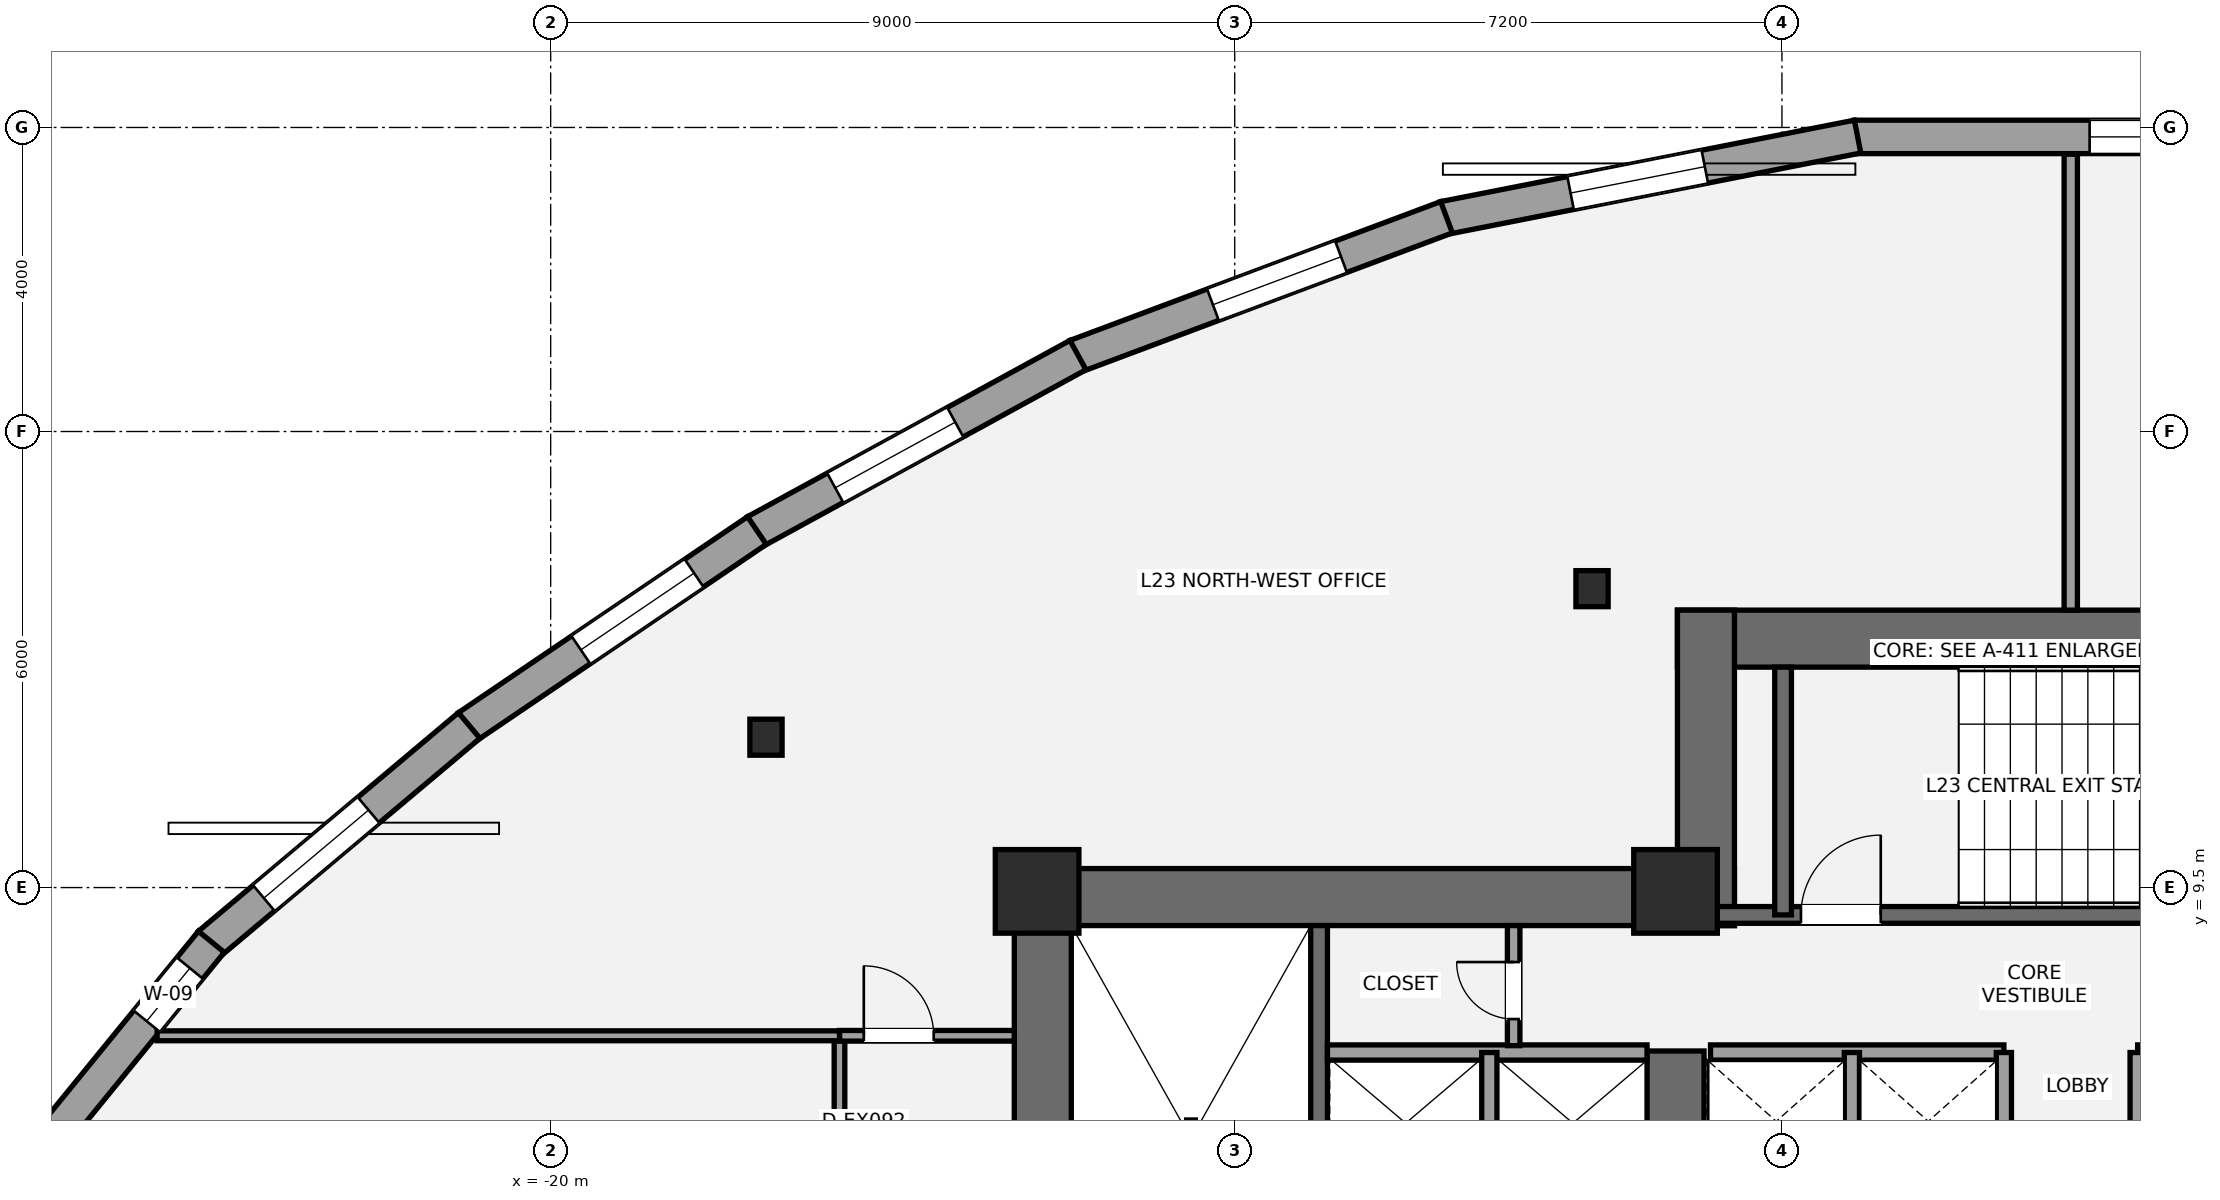
"""IFC4 building model, lengths in metres.
Left out: names, types, materials, properties, quantities, classifications, styles, units other than length and angle.
Written with IfcOpenShell. Run it as: python <this file> out.ifc"""

import sys

from ifc_helpers import new_model, si_unit, direction, frame, frame_2d, origin, origin_2d, place, context, subcontext, project, spatial, rectangle, i_section, extrude, element, fill, save


model = new_model("IFC4")
c1 = context("Model", 3, precision=1e-05, world=origin(), true_north=direction((0.0, 1.0)))
c2 = subcontext(c1, "Body", "Model", "MODEL_VIEW")
j1 = project(units=[si_unit("LENGTHUNIT", "METRE"), si_unit("PLANEANGLEUNIT", "RADIAN")], contexts=[c1])
p1 = place(None, origin())
s1 = spatial("IfcSite", under=j1, at=p1, CompositionType="ELEMENT")
p2 = place(p1, origin())
s2 = spatial("IfcBuilding", under=s1, at=p2, CompositionType="ELEMENT")
p3 = place(p2, frame((0.0, 0.0, 89.6)))
s3 = spatial("IfcBuildingStorey", under=s2, at=p3, CompositionType="ELEMENT", Elevation=89.6)
p4 = place(p3, frame((-13.525, 1.1, 0.0), z_axis=(0.0, 0.0, 1.0), x_axis=(0.0, 1.0, 0.0)))
e1 = element("IfcWall", 1, at=p4, inside=s3, PredefinedType="SHEAR", context=c2, shape_type="SweptSolid", body=[
    extrude(rectangle(XDim=8.65, YDim=0.75, at=frame_2d((4.325, 0.0))), origin(), (0.0, 0.0, 1.0), 3.5),
])
p5 = place(p3, frame((-13.9, 9.375, 0.0), z_axis=(0.0, 0.0, 1.0), x_axis=(1.0, 0.0, 0.0)))
e2 = element("IfcWall", 2, at=p5, inside=s3, PredefinedType="SHEAR", context=c2, shape_type="SweptSolid", body=[
    extrude(rectangle(XDim=9.475, YDim=0.75, at=frame_2d((4.737, 0.0))), origin(), (0.0, 0.0, 1.0), 3.5),
])
p6 = place(p3, frame((-5.2, 5.35, 0.0), z_axis=(0.0, 0.0, 1.0), x_axis=(0.0, 1.0, 0.0)))
e3 = element("IfcWall", 3, at=p6, inside=s3, PredefinedType="SHEAR", context=c2, shape_type="SweptSolid", body=[
    extrude(rectangle(XDim=2.0, YDim=0.75, at=frame_2d((1.0, 0.0))), origin(), (0.0, 0.0, 1.0), 3.5),
])
p7 = place(p3, frame((-9.89, 1.85, 0.0), z_axis=(0.0, 0.0, 1.0), x_axis=(0.0, 1.0, 0.0)))
e4 = element("IfcWall", 4, at=p7, inside=s3, PredefinedType="SHEAR", context=c2, shape_type="SweptSolid", body=[
    extrude(rectangle(XDim=7.15, YDim=0.22, at=frame_2d((3.575, 0.0))), origin(), (0.0, 0.0, 1.0), 3.5),
])
p8 = place(p3, frame((-5.175, 12.775, 0.0), z_axis=(0.0, 0.0, 1.0), x_axis=(1.0, 0.0, 0.0)))
e5 = element("IfcWall", 5, at=p8, inside=s3, PredefinedType="SHEAR", context=c2, shape_type="SweptSolid", body=[
    extrude(rectangle(XDim=10.35, YDim=0.75, at=frame_2d((5.175, 0.0))), origin(), (0.0, 0.0, 1.0), 3.5),
])
p9 = place(p3, frame((-4.8, 9.0, 0.0), z_axis=(0.0, 0.0, 1.0), x_axis=(0.0, 1.0, 0.0)))
e6 = element("IfcWall", 6, at=p9, inside=s3, PredefinedType="SHEAR", context=c2, shape_type="SweptSolid", body=[
    extrude(rectangle(XDim=4.15, YDim=0.75, at=frame_2d((2.075, 0.0))), origin(), (0.0, 0.0, 1.0), 3.5),
])
p10 = place(p3, frame((-4.7, 9.14, 0.0), z_axis=(0.0, 0.0, 1.0), x_axis=(1.0, 0.0, 0.0)))
e7 = element("IfcWall", 7, at=p10, inside=s3, PredefinedType="SHEAR", context=c2, shape_type="SweptSolid", body=[
    extrude(rectangle(XDim=9.3, YDim=0.22, at=frame_2d((4.65, 0.0))), origin(), (0.0, 0.0, 1.0), 3.5),
])
p11 = place(p10, frame((1.15, 0.0, 0.0)))
e8 = element("IfcOpeningElement", 8, at=p11, cuts=e7, PredefinedType="OPENING", context=c2, shape_type="SweptSolid", body=[
    extrude(rectangle(XDim=1.05, YDim=2.15, at=frame_2d((0.525, 1.075))), frame((0.0, 0.12, 0.0), z_axis=(0.0, -1.0, 0.0), x_axis=(1.0, 0.0, 0.0)), (0.0, 0.0, 1.0), 0.24),
])
p12 = place(p3, frame((-3.785, 9.14, 0.0), z_axis=(0.0, 0.0, 1.0), x_axis=(0.0, 1.0, 0.0)))
e9 = element("IfcWall", 9, at=p12, inside=s3, PredefinedType="SHEAR", context=c2, shape_type="SweptSolid", body=[
    extrude(rectangle(XDim=3.26, YDim=0.22, at=frame_2d((1.63, 0.0))), origin(), (0.0, 0.0, 1.0), 3.5),
])
for number, where, z_axis, x_axis in (
    (10, (-13.6, 9.45, 0.0), (0.0, 0.0, 1.0), (1.0, 0.0, 0.0)),
    (11, (-5.2, 9.45, 0.0), (0.0, 0.0, 1.0), (1.0, 0.0, 0.0)),
):
    element("IfcColumn", number, at=place(p3, frame(where, z_axis=z_axis, x_axis=x_axis)), inside=s3, PredefinedType="COLUMN", context=c2, shape_type="SweptSolid", body=[
        extrude(rectangle(XDim=1.1, YDim=1.1, at=origin_2d()), origin(), (0.0, 0.0, 1.0), 3.5),
    ])
for number, where, z_axis, x_axis in (
    (12, (-6.299, 13.433, 0.0), (0.0, 0.0, 1.0), (1.0, 0.0, 0.0)),
    (13, (-17.167, 11.478, 0.0), (0.0, 0.0, 1.0), (1.0, 0.0, 0.0)),
):
    element("IfcColumn", number, at=place(p3, frame(where, z_axis=z_axis, x_axis=x_axis)), inside=s3, PredefinedType="COLUMN", context=c2, shape_type="SweptSolid", body=[
        extrude(i_section(OverallWidth=0.424, OverallDepth=0.474, WebThickness=0.048, FlangeThickness=0.077, at=origin_2d()), origin(), (0.0, 0.0, 1.0), 3.5),
    ])
p13 = place(p3, frame((-2.847, 19.376, 0.0), z_axis=(0.0, 0.0, 1.0), x_axis=(1.0, 0.0, 0.0)))
e14 = element("IfcWall", 14, at=p13, inside=s3, PredefinedType="STANDARD", context=c2, shape_type="SweptSolid", body=[
    extrude(rectangle(XDim=5.695, YDim=0.44, at=frame_2d((2.847, 0.0))), origin(), (0.0, 0.0, 1.0), 2.528),
])
p14 = place(p13, frame((3.095, 0.0, 0.65)))
e15 = element("IfcOpeningElement", 15, at=p14, cuts=e14, PredefinedType="OPENING", context=c2, shape_type="SweptSolid", body=[
    extrude(rectangle(XDim=1.8, YDim=1.7, at=frame_2d((0.9, 0.85))), frame((0.0, 0.23, 0.0), z_axis=(0.0, -1.0, 0.0), x_axis=(1.0, 0.0, 0.0)), (0.0, 0.0, 1.0), 0.46),
])
p15 = place(p3, frame((-8.248, 18.309, 0.0), z_axis=(0.0, 0.0, 1.0), x_axis=(0.981185300561, 0.19306839711, 0.0)))
e16 = element("IfcWall", 16, at=p15, inside=s3, PredefinedType="STANDARD", context=c2, shape_type="SweptSolid", body=[
    extrude(rectangle(XDim=5.548, YDim=0.44, at=frame_2d((2.774, 0.0))), origin(), (0.0, 0.0, 1.0), 2.528),
])
p16 = place(p15, frame((1.699, 0.0, 0.65)))
e17 = element("IfcOpeningElement", 17, at=p16, cuts=e16, PredefinedType="OPENING", context=c2, shape_type="SweptSolid", body=[
    extrude(rectangle(XDim=1.8, YDim=1.7, at=frame_2d((0.9, 0.85))), frame((0.0, 0.23, 0.0), z_axis=(0.0, -1.0, 0.0), x_axis=(1.0, 0.0, 0.0)), (0.0, 0.0, 1.0), 0.46),
])
p17 = place(p3, frame((-13.09, 16.492, 0.0), z_axis=(0.0, 0.0, 1.0), x_axis=(0.936473584013, 0.350738116613, 0.0)))
e18 = element("IfcWall", 18, at=p17, inside=s3, PredefinedType="STANDARD", context=c2, shape_type="SweptSolid", body=[
    extrude(rectangle(XDim=5.208, YDim=0.44, at=frame_2d((2.604, 0.0))), origin(), (0.0, 0.0, 1.0), 2.528),
])
p18 = place(p17, frame((1.926, 0.0, 0.65)))
e19 = element("IfcOpeningElement", 19, at=p18, cuts=e18, PredefinedType="OPENING", context=c2, shape_type="SweptSolid", body=[
    extrude(rectangle(XDim=1.8, YDim=1.7, at=frame_2d((0.9, 0.85))), frame((0.0, 0.23, 0.0), z_axis=(0.0, -1.0, 0.0), x_axis=(1.0, 0.0, 0.0)), (0.0, 0.0, 1.0), 0.46),
])
p19 = place(p3, frame((-17.304, 14.186, 0.0), z_axis=(0.0, 0.0, 1.0), x_axis=(0.877445532469, 0.479676284123, 0.0)))
e20 = element("IfcWall", 20, at=p19, inside=s3, PredefinedType="STANDARD", context=c2, shape_type="SweptSolid", body=[
    extrude(rectangle(XDim=4.835, YDim=0.44, at=frame_2d((2.417, 0.0))), origin(), (0.0, 0.0, 1.0), 2.528),
])
p20 = place(p19, frame((1.194, 0.0, 0.65)))
e21 = element("IfcOpeningElement", 21, at=p20, cuts=e20, PredefinedType="OPENING", context=c2, shape_type="SweptSolid", body=[
    extrude(rectangle(XDim=1.8, YDim=1.7, at=frame_2d((0.9, 0.85))), frame((0.0, 0.23, 0.0), z_axis=(0.0, -1.0, 0.0), x_axis=(1.0, 0.0, 0.0)), (0.0, 0.0, 1.0), 0.46),
])
p21 = place(p3, frame((-21.09, 11.619, 0.0), z_axis=(0.0, 0.0, 1.0), x_axis=(0.827742791179, 0.561107718403, 0.0)))
e22 = element("IfcWall", 22, at=p21, inside=s3, PredefinedType="STANDARD", context=c2, shape_type="SweptSolid", body=[
    extrude(rectangle(XDim=4.595, YDim=0.44, at=frame_2d((2.298, 0.0))), origin(), (0.0, 0.0, 1.0), 2.528),
])
p22 = place(p21, frame((1.797, 0.0, 0.65)))
e23 = element("IfcOpeningElement", 23, at=p22, cuts=e22, PredefinedType="OPENING", context=c2, shape_type="SweptSolid", body=[
    extrude(rectangle(XDim=1.8, YDim=1.7, at=frame_2d((0.9, 0.85))), frame((0.0, 0.23, 0.0), z_axis=(0.0, -1.0, 0.0), x_axis=(1.0, 0.0, 0.0)), (0.0, 0.0, 1.0), 0.46),
])
p23 = place(p3, frame((-24.493, 8.757, 0.0), z_axis=(0.0, 0.0, 1.0), x_axis=(0.765563867956, 0.643359902449, 0.0)))
e24 = element("IfcWall", 24, at=p23, inside=s3, PredefinedType="STANDARD", context=c2, shape_type="SweptSolid", body=[
    extrude(rectangle(XDim=4.469, YDim=0.44, at=frame_2d((2.234, 0.0))), origin(), (0.0, 0.0, 1.0), 2.528),
])
p24 = place(p23, frame((0.94, 0.0, 0.65)))
e25 = element("IfcOpeningElement", 25, at=p24, cuts=e24, PredefinedType="OPENING", context=c2, shape_type="SweptSolid", body=[
    extrude(rectangle(XDim=1.8, YDim=1.7, at=frame_2d((0.9, 0.85))), frame((0.0, 0.23, 0.0), z_axis=(0.0, -1.0, 0.0), x_axis=(1.0, 0.0, 0.0)), (0.0, 0.0, 1.0), 0.46),
])
p25 = place(p3, frame((-27.159, 5.48, 0.0), z_axis=(0.0, 0.0, 1.0), x_axis=(0.631768505266, 0.775157116818, 0.0)))
e26 = element("IfcWall", 26, at=p25, inside=s3, PredefinedType="STANDARD", context=c2, shape_type="SweptSolid", body=[
    extrude(rectangle(XDim=4.265, YDim=0.44, at=frame_2d((2.133, 0.0))), origin(), (0.0, 0.0, 1.0), 2.528),
])
p26 = place(p25, frame((2.918, 0.0, 0.58)))
e27 = element("IfcOpeningElement", 27, at=p26, cuts=e26, PredefinedType="OPENING", context=c2, shape_type="SweptSolid", body=[
    extrude(rectangle(XDim=0.9, YDim=1.35, at=frame_2d((0.45, 0.675))), frame((0.0, 0.23, 0.0), z_axis=(0.0, -1.0, 0.0), x_axis=(1.0, 0.0, 0.0)), (0.0, 0.0, 1.0), 0.46),
])
p27 = place(p3, frame((-9.78, 7.33, 0.0), z_axis=(0.0, 0.0, 1.0), x_axis=(1.0, 0.0, 0.0)))
e28 = element("IfcWall", 28, at=p27, inside=s3, PredefinedType="SOLIDWALL", context=c2, shape_type="SweptSolid", body=[
    extrude(rectangle(XDim=4.205, YDim=0.2, at=frame_2d((2.103, 0.0))), origin(), (0.0, 0.0, 1.0), 3.31),
])
p28 = place(p3, frame((-7.65, 5.47, 0.0), z_axis=(0.0, 0.0, 1.0), x_axis=(0.0, 1.0, 0.0)))
e29 = element("IfcWall", 29, at=p28, inside=s3, PredefinedType="SOLIDWALL", context=c2, shape_type="SweptSolid", body=[
    extrude(rectangle(XDim=1.86, YDim=0.2, at=frame_2d((0.93, 0.0))), origin(), (0.0, 0.0, 1.0), 3.31),
])
for number, where, z_axis, x_axis in (
    (30, (-4.74, 7.33, 0.0), (0.0, 0.0, 1.0), (1.0, 0.0, 0.0)),
    (31, (0.88, 7.33, 0.0), (0.0, 0.0, 1.0), (1.0, 0.0, 0.0)),
):
    element("IfcWall", number, at=place(p3, frame(where, z_axis=z_axis, x_axis=x_axis)), inside=s3, PredefinedType="SOLIDWALL", context=c2, shape_type="SweptSolid", body=[
        extrude(rectangle(XDim=3.86, YDim=0.2, at=frame_2d((1.93, 0.0))), origin(), (0.0, 0.0, 1.0), 3.31),
    ])
for number, where, z_axis, x_axis in (
    (32, (-2.88, 5.52, 0.0), (0.0, 0.0, 1.0), (0.0, 1.0, 0.0)),
    (33, (-0.88, 5.52, 0.0), (0.0, 0.0, 1.0), (0.0, 1.0, 0.0)),
    (34, (0.88, 5.52, 0.0), (0.0, 0.0, 1.0), (0.0, 1.0, 0.0)),
):
    element("IfcWall", number, at=place(p3, frame(where, z_axis=z_axis, x_axis=x_axis)), inside=s3, PredefinedType="SOLIDWALL", context=c2, shape_type="SweptSolid", body=[
        extrude(rectangle(XDim=1.81, YDim=0.2, at=frame_2d((0.905, 0.0))), origin(), (0.0, 0.0, 1.0), 3.31),
    ])
p29 = place(p3, frame((-7.33, 7.42, 0.0), z_axis=(0.0, 0.0, 1.0), x_axis=(0.0, 1.0, 0.0)))
e35 = element("IfcWall", 35, at=p29, inside=s3, PredefinedType="PARTITIONING", context=c2, shape_type="SweptSolid", body=[
    extrude(rectangle(XDim=1.58, YDim=0.165, at=frame_2d((0.79, 0.0))), origin(), (0.0, 0.0, 1.0), 3.31),
])
p30 = place(p29, frame((0.35, 0.0, 0.0)))
e36 = element("IfcOpeningElement", 36, at=p30, cuts=e35, PredefinedType="OPENING", context=c2, shape_type="SweptSolid", body=[
    extrude(rectangle(XDim=0.75, YDim=2.1, at=frame_2d((0.375, 1.05))), frame((0.0, 0.093, 0.0), z_axis=(0.0, -1.0, 0.0), x_axis=(1.0, 0.0, 0.0)), (0.0, 0.0, 1.0), 0.185),
])
p31 = place(p3, frame((-16.2, -14.53, 0.0), z_axis=(0.0, 0.0, 1.0), x_axis=(0.0, 1.0, 0.0)))
e37 = element("IfcWall", 37, at=p31, inside=s3, PredefinedType="PARTITIONING", context=c2, shape_type="SweptSolid", body=[
    extrude(rectangle(XDim=22.08, YDim=0.14, at=frame_2d((11.04, 0.0))), origin(), (0.0, 0.0, 1.0), 2.751),
])
p32 = place(p31, frame((12.18, 0.0, 0.0)))
e38 = element("IfcOpeningElement", 38, at=p32, cuts=e37, PredefinedType="OPENING", context=c2, shape_type="SweptSolid", body=[
    extrude(rectangle(XDim=0.9, YDim=2.1, at=frame_2d((0.45, 1.05))), frame((0.0, 0.08, 0.0), z_axis=(0.0, -1.0, 0.0), x_axis=(1.0, 0.0, 0.0)), (0.0, 0.0, 1.0), 0.16),
])
p33 = place(p31, frame((18.855, 0.0, 0.0)))
e39 = element("IfcOpeningElement", 39, at=p33, cuts=e37, PredefinedType="OPENING", context=c2, shape_type="SweptSolid", body=[
    extrude(rectangle(XDim=0.9, YDim=2.1, at=frame_2d((0.45, 1.05))), frame((0.0, 0.08, 0.0), z_axis=(0.0, -1.0, 0.0), x_axis=(1.0, 0.0, 0.0)), (0.0, 0.0, 1.0), 0.16),
])
p34 = place(p3, frame((-16.2, 7.55, 0.0), z_axis=(0.0, 0.0, 1.0), x_axis=(1.0, 0.0, 0.0)))
e40 = element("IfcWall", 40, at=p34, inside=s3, PredefinedType="PARTITIONING", context=c2, shape_type="SweptSolid", body=[
    extrude(rectangle(XDim=2.3, YDim=0.14, at=frame_2d((1.15, 0.0))), origin(), (0.0, 0.0, 1.0), 2.763),
])
p35 = place(p34, frame((0.32, 0.0, 0.0)))
e41 = element("IfcOpeningElement", 41, at=p35, cuts=e40, PredefinedType="OPENING", context=c2, shape_type="SweptSolid", body=[
    extrude(rectangle(XDim=0.92, YDim=2.15, at=frame_2d((0.46, 1.075))), frame((0.0, 0.08, 0.0), z_axis=(0.0, -1.0, 0.0), x_axis=(1.0, 0.0, 0.0)), (0.0, 0.0, 1.0), 0.16),
])
p36 = place(p3, frame((0.0, 13.15, 0.0), z_axis=(0.0, 0.0, 1.0), x_axis=(0.0, 1.0, 0.0)))
e42 = element("IfcWall", 42, at=p36, inside=s3, PredefinedType="PARTITIONING", context=c2, shape_type="SweptSolid", body=[
    extrude(rectangle(XDim=5.998, YDim=0.175, at=frame_2d((2.999, 0.0))), origin(), (0.0, 0.0, 1.0), 2.763),
])
p37 = place(p3, frame((-25.178, 7.55, 0.0), z_axis=(0.0, 0.0, 1.0), x_axis=(1.0, 0.0, 0.0)))
e43 = element("IfcWall", 43, at=p37, inside=s3, PredefinedType="PARTITIONING", context=c2, shape_type="SweptSolid", body=[
    extrude(rectangle(XDim=8.978, YDim=0.13, at=frame_2d((4.489, 0.0))), origin(), (0.0, 0.0, 1.0), 2.763),
])
p38 = place(p14, origin())
e44 = element("IfcWindow", 44, at=p38, inside=s3, PartitioningType="SINGLE_PANEL", PredefinedType="WINDOW", context=c2, shape_type="SweptSolid", body=[
    extrude(rectangle(XDim=1.8, YDim=1.7, at=frame_2d((0.9, 0.85))), frame((0.0, -0.01, 0.0), z_axis=(0.0, -1.0, 0.0), x_axis=(1.0, 0.0, 0.0)), (0.0, 0.0, 1.0), 0.06),
])
fill(e15, e44)
p39 = place(p16, origin())
e45 = element("IfcWindow", 45, at=p39, inside=s3, PartitioningType="SINGLE_PANEL", PredefinedType="WINDOW", context=c2, shape_type="SweptSolid", body=[
    extrude(rectangle(XDim=1.8, YDim=1.7, at=frame_2d((0.9, 0.85))), frame((0.0, -0.01, 0.0), z_axis=(0.0, -1.0, 0.0), x_axis=(1.0, 0.0, 0.0)), (0.0, 0.0, 1.0), 0.06),
])
fill(e17, e45)
p40 = place(p18, origin())
e46 = element("IfcWindow", 46, at=p40, inside=s3, PartitioningType="SINGLE_PANEL", PredefinedType="WINDOW", context=c2, shape_type="SweptSolid", body=[
    extrude(rectangle(XDim=1.8, YDim=1.7, at=frame_2d((0.9, 0.85))), frame((0.0, -0.01, 0.0), z_axis=(0.0, -1.0, 0.0), x_axis=(1.0, 0.0, 0.0)), (0.0, 0.0, 1.0), 0.06),
])
fill(e19, e46)
p41 = place(p20, origin())
e47 = element("IfcWindow", 47, at=p41, inside=s3, PartitioningType="SINGLE_PANEL", PredefinedType="WINDOW", context=c2, shape_type="SweptSolid", body=[
    extrude(rectangle(XDim=1.8, YDim=1.7, at=frame_2d((0.9, 0.85))), frame((0.0, -0.01, 0.0), z_axis=(0.0, -1.0, 0.0), x_axis=(1.0, 0.0, 0.0)), (0.0, 0.0, 1.0), 0.06),
])
fill(e21, e47)
p42 = place(p22, origin())
e48 = element("IfcWindow", 48, at=p42, inside=s3, PartitioningType="SINGLE_PANEL", PredefinedType="WINDOW", context=c2, shape_type="SweptSolid", body=[
    extrude(rectangle(XDim=1.8, YDim=1.7, at=frame_2d((0.9, 0.85))), frame((0.0, -0.01, 0.0), z_axis=(0.0, -1.0, 0.0), x_axis=(1.0, 0.0, 0.0)), (0.0, 0.0, 1.0), 0.06),
])
fill(e23, e48)
p43 = place(p24, origin())
e49 = element("IfcWindow", 49, at=p43, inside=s3, PartitioningType="SINGLE_PANEL", PredefinedType="WINDOW", context=c2, shape_type="SweptSolid", body=[
    extrude(rectangle(XDim=1.8, YDim=1.7, at=frame_2d((0.9, 0.85))), frame((0.0, -0.01, 0.0), z_axis=(0.0, -1.0, 0.0), x_axis=(1.0, 0.0, 0.0)), (0.0, 0.0, 1.0), 0.06),
])
fill(e25, e49)
p44 = place(p26, origin())
e50 = element("IfcWindow", 50, at=p44, inside=s3, PartitioningType="SINGLE_PANEL", PredefinedType="WINDOW", context=c2, shape_type="SweptSolid", body=[
    extrude(rectangle(XDim=0.9, YDim=1.35, at=frame_2d((0.45, 0.675))), frame((0.0, -0.01, 0.0), z_axis=(0.0, -1.0, 0.0), x_axis=(1.0, 0.0, 0.0)), (0.0, 0.0, 1.0), 0.06),
])
fill(e27, e50)
p45 = place(p11, origin())
e51 = element("IfcDoor", 51, at=p45, inside=s3, OperationType="SINGLE_SWING_RIGHT", PredefinedType="DOOR", context=c2, shape_type="SweptSolid", body=[
    extrude(rectangle(XDim=1.05, YDim=2.15, at=frame_2d((0.525, 1.075))), frame((0.0, 0.025, 0.0), z_axis=(0.0, -1.0, 0.0), x_axis=(1.0, 0.0, 0.0)), (0.0, 0.0, 1.0), 0.05),
])
fill(e8, e51)
p46 = place(p30, origin())
e52 = element("IfcDoor", 52, at=p46, inside=s3, OperationType="SINGLE_SWING_RIGHT", PredefinedType="DOOR", context=c2, shape_type="SweptSolid", body=[
    extrude(rectangle(XDim=0.75, YDim=2.1, at=frame_2d((0.375, 1.05))), frame((0.0, 0.025, 0.0), z_axis=(0.0, -1.0, 0.0), x_axis=(1.0, 0.0, 0.0)), (0.0, 0.0, 1.0), 0.05),
])
fill(e36, e52)
p47 = place(p35, origin())
e53 = element("IfcDoor", 53, at=p47, inside=s3, OperationType="SINGLE_SWING_LEFT", PredefinedType="DOOR", context=c2, shape_type="SweptSolid", body=[
    extrude(rectangle(XDim=0.92, YDim=2.15, at=frame_2d((0.46, 1.075))), frame((0.0, 0.025, 0.0), z_axis=(0.0, -1.0, 0.0), x_axis=(1.0, 0.0, 0.0)), (0.0, 0.0, 1.0), 0.05),
])
fill(e41, e53)
save(model, sys.argv[1])
